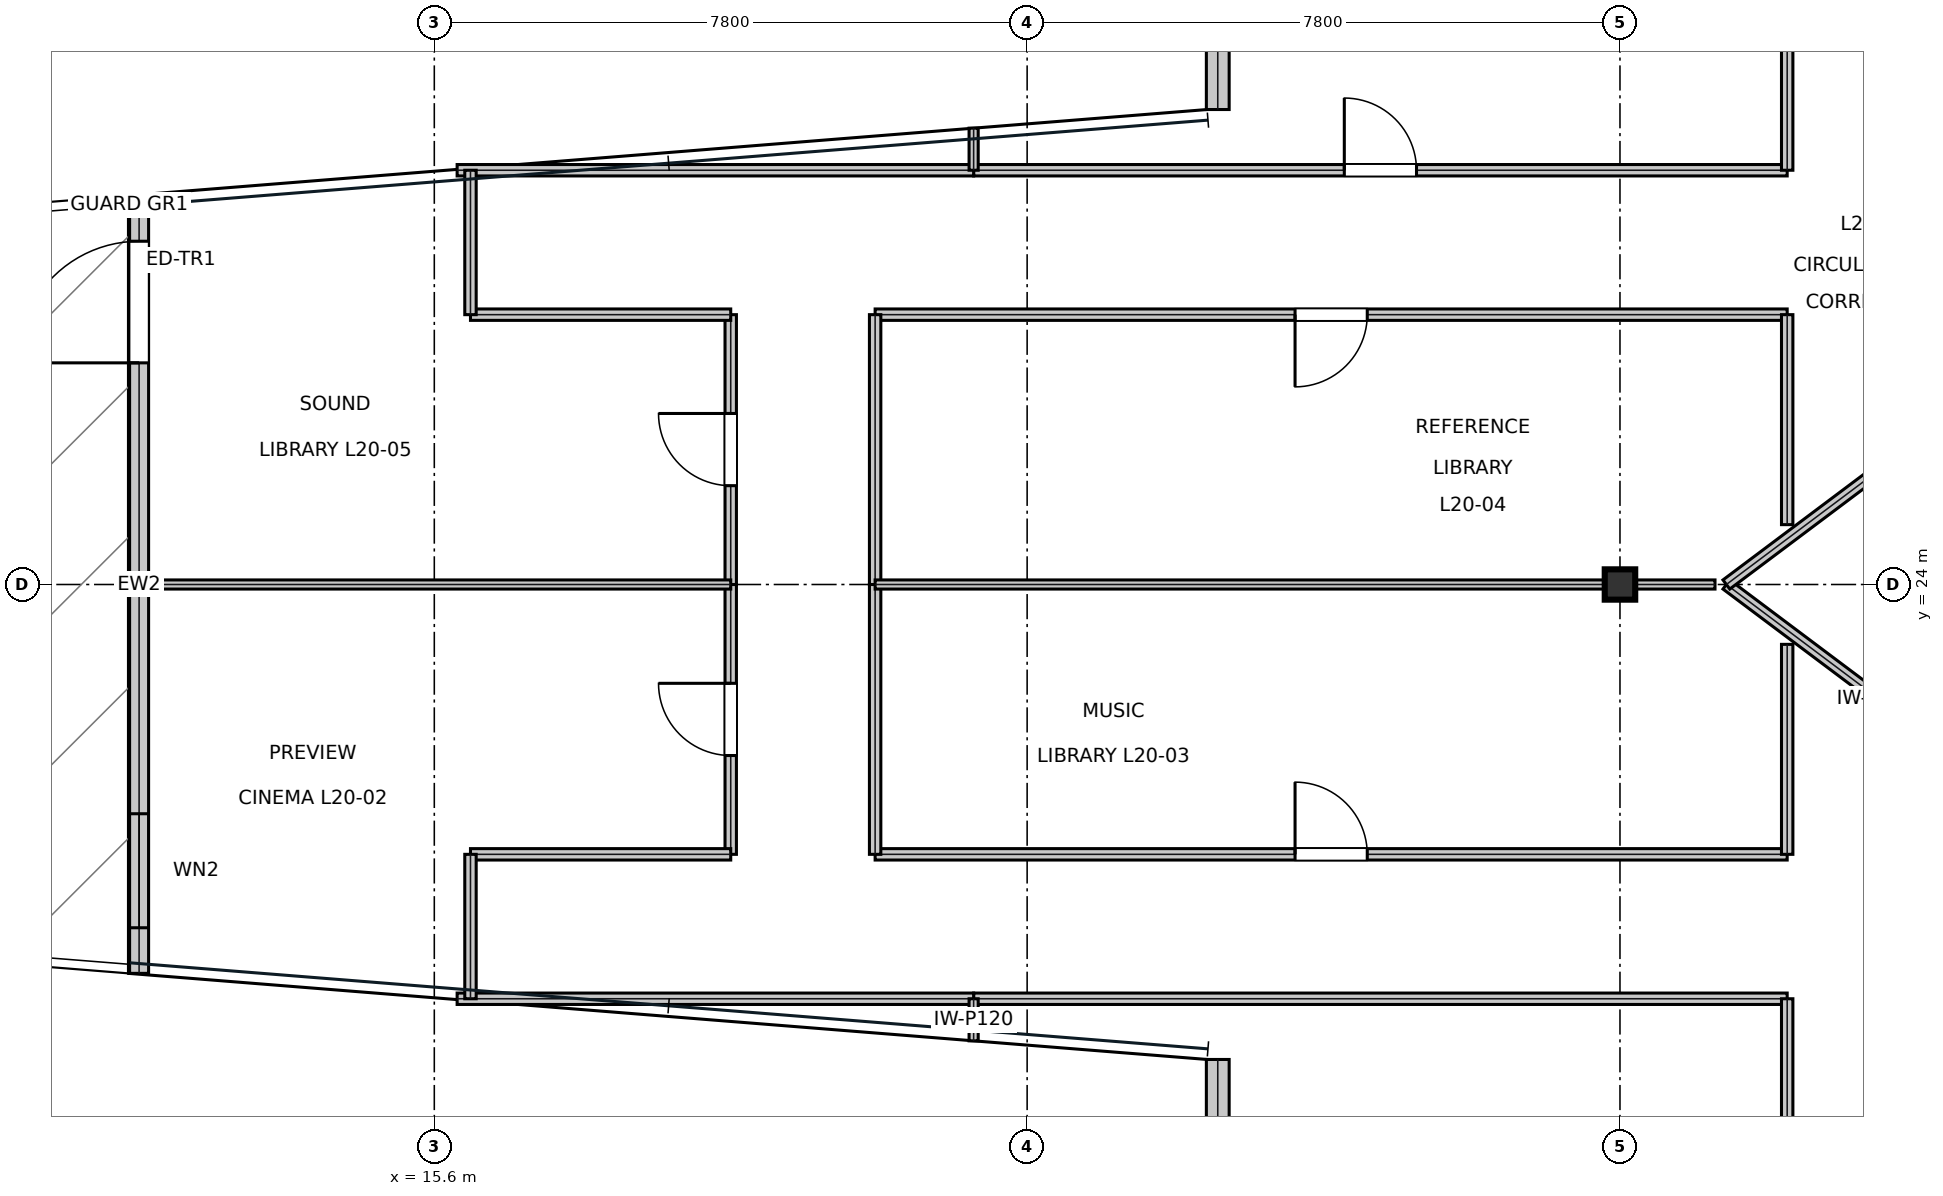
"""IFC4 building model, lengths in metres.
Left out: names, types, materials, properties, quantities, classifications, styles, units other than length and angle.
Written with IfcOpenShell. Run it as: python <this file> out.ifc"""

import sys

from ifc_helpers import new_model, si_unit, direction, frame, frame_2d, origin, origin_2d, place, context, subcontext, project, spatial, rectangle, i_section, extrude, element, fill, save


model = new_model("IFC4")
c1 = context("Model", 3, precision=1e-05, world=origin(), true_north=direction((0.0, 1.0)))
c2 = subcontext(c1, "Body", "Model", "MODEL_VIEW")
j1 = project(units=[si_unit("LENGTHUNIT", "METRE"), si_unit("PLANEANGLEUNIT", "RADIAN")], contexts=[c1])
p1 = place(None, origin())
s1 = spatial("IfcSite", under=j1, at=p1, CompositionType="ELEMENT")
p2 = place(p1, origin())
s2 = spatial("IfcBuilding", under=s1, at=p2, CompositionType="ELEMENT")
p3 = place(p2, frame((0.0, 0.0, 90.45)))
s3 = spatial("IfcBuildingStorey", under=s2, at=p3, CompositionType="ELEMENT", Elevation=90.45)
p4 = place(p3, frame((31.2, 24.0, 0.0), z_axis=(0.0, 0.0, 1.0), x_axis=(1.0, 0.0, 0.0)))
e1 = element("IfcColumn", 1, at=p4, inside=s3, PredefinedType="COLUMN", context=c2, shape_type="SweptSolid", body=[
    extrude(i_section(OverallWidth=0.401, OverallDepth=0.399, WebThickness=0.025, FlangeThickness=0.04, at=origin_2d()), origin(), (0.0, 0.0, 1.0), 4.044),
])
p5 = place(p3, frame((25.908, 32.0, 0.0), z_axis=(0.0, 0.0, 1.0), x_axis=(0.0, -1.0, 0.0)))
e2 = element("IfcWall", 2, at=p5, inside=s3, PredefinedType="STANDARD", context=c2, shape_type="SweptSolid", body=[
    extrude(rectangle(XDim=1.751, YDim=0.3, at=frame_2d((0.875, 0.0))), origin(), (0.0, 0.0, 1.0), 3.338),
])
p6 = place(p3, frame((11.716, 29.116, 0.0), z_axis=(0.0, 0.0, 1.0), x_axis=(0.0, -1.0, 0.0)))
e3 = element("IfcWall", 3, at=p6, inside=s3, PredefinedType="STANDARD", context=c2, shape_type="SweptSolid", body=[
    extrude(rectangle(XDim=10.232, YDim=0.25, at=frame_2d((5.116, 0.0))), origin(), (0.0, 0.0, 1.0), 3.181),
])
p7 = place(p6, frame((0.6, 0.0, 0.0)))
e4 = element("IfcOpeningElement", 4, at=p7, cuts=e3, PredefinedType="OPENING", context=c2, shape_type="SweptSolid", body=[
    extrude(rectangle(XDim=1.6, YDim=2.2, at=frame_2d((0.8, 1.1))), frame((0.0, 0.135, 0.0), z_axis=(0.0, -1.0, 0.0), x_axis=(1.0, 0.0, 0.0)), (0.0, 0.0, 1.0), 0.27),
])
p8 = place(p6, frame((8.132, 0.0, 0.95)))
e5 = element("IfcOpeningElement", 5, at=p8, cuts=e3, PredefinedType="OPENING", context=c2, shape_type="SweptSolid", body=[
    extrude(rectangle(XDim=1.5, YDim=1.6, at=frame_2d((0.75, 0.8))), frame((0.0, 0.135, 0.0), z_axis=(0.0, -1.0, 0.0), x_axis=(1.0, 0.0, 0.0)), (0.0, 0.0, 1.0), 0.27),
])
p9 = place(p3, frame((25.908, 17.751, 0.0), z_axis=(0.0, 0.0, 1.0), x_axis=(0.0, -1.0, 0.0)))
e6 = element("IfcWall", 6, at=p9, inside=s3, PredefinedType="STANDARD", context=c2, shape_type="SweptSolid", body=[
    extrude(rectangle(XDim=1.751, YDim=0.3, at=frame_2d((0.875, 0.0))), origin(), (0.0, 0.0, 1.0), 3.338),
])
p10 = place(p3, frame((19.5, 20.45, 0.0), z_axis=(0.0, 0.0, 1.0), x_axis=(0.0, 1.0, 0.0)))
e7 = element("IfcWall", 7, at=p10, inside=s3, PredefinedType="PARTITIONING", context=c2, shape_type="SweptSolid", body=[
    extrude(rectangle(XDim=3.55, YDim=0.15, at=frame_2d((1.775, 0.0))), origin(), (0.0, 0.0, 1.0), 3.181),
])
p11 = place(p10, frame((1.3, 0.0, 0.0)))
e8 = element("IfcOpeningElement", 8, at=p11, cuts=e7, PredefinedType="OPENING", context=c2, shape_type="SweptSolid", body=[
    extrude(rectangle(XDim=0.95, YDim=2.15, at=frame_2d((0.475, 1.075))), frame((0.0, 0.085, 0.0), z_axis=(0.0, -1.0, 0.0), x_axis=(1.0, 0.0, 0.0)), (0.0, 0.0, 1.0), 0.17),
])
p12 = place(p3, frame((21.4, 20.45, 0.0), z_axis=(0.0, 0.0, 1.0), x_axis=(1.0, 0.0, 0.0)))
e9 = element("IfcWall", 9, at=p12, inside=s3, PredefinedType="PARTITIONING", context=c2, shape_type="SweptSolid", body=[
    extrude(rectangle(XDim=12.0, YDim=0.15, at=frame_2d((6.0, 0.0))), origin(), (0.0, 0.0, 1.0), 3.181),
])
p13 = place(p12, frame((5.525, 0.0, 0.0)))
e10 = element("IfcOpeningElement", 10, at=p13, cuts=e9, PredefinedType="OPENING", context=c2, shape_type="SweptSolid", body=[
    extrude(rectangle(XDim=0.95, YDim=2.15, at=frame_2d((0.475, 1.075))), frame((0.0, 0.085, 0.0), z_axis=(0.0, -1.0, 0.0), x_axis=(1.0, 0.0, 0.0)), (0.0, 0.0, 1.0), 0.17),
])
p14 = place(p3, frame((21.4, 27.55, 0.0), z_axis=(0.0, 0.0, 1.0), x_axis=(1.0, 0.0, 0.0)))
e11 = element("IfcWall", 11, at=p14, inside=s3, PredefinedType="PARTITIONING", context=c2, shape_type="SweptSolid", body=[
    extrude(rectangle(XDim=12.0, YDim=0.15, at=frame_2d((6.0, 0.0))), origin(), (0.0, 0.0, 1.0), 3.181),
])
p15 = place(p14, frame((5.525, 0.0, 0.0)))
e12 = element("IfcOpeningElement", 12, at=p15, cuts=e11, PredefinedType="OPENING", context=c2, shape_type="SweptSolid", body=[
    extrude(rectangle(XDim=0.95, YDim=2.15, at=frame_2d((0.475, 1.075))), frame((0.0, 0.085, 0.0), z_axis=(0.0, -1.0, 0.0), x_axis=(1.0, 0.0, 0.0)), (0.0, 0.0, 1.0), 0.17),
])
p16 = place(p3, frame((19.5, 24.0, 0.0), z_axis=(0.0, 0.0, 1.0), x_axis=(0.0, 1.0, 0.0)))
e13 = element("IfcWall", 13, at=p16, inside=s3, PredefinedType="PARTITIONING", context=c2, shape_type="SweptSolid", body=[
    extrude(rectangle(XDim=3.55, YDim=0.15, at=frame_2d((1.775, 0.0))), origin(), (0.0, 0.0, 1.0), 3.181),
])
p17 = place(p16, frame((1.3, 0.0, 0.0)))
e14 = element("IfcOpeningElement", 14, at=p17, cuts=e13, PredefinedType="OPENING", context=c2, shape_type="SweptSolid", body=[
    extrude(rectangle(XDim=0.95, YDim=2.15, at=frame_2d((0.475, 1.075))), frame((0.0, 0.085, 0.0), z_axis=(0.0, -1.0, 0.0), x_axis=(1.0, 0.0, 0.0)), (0.0, 0.0, 1.0), 0.17),
])
p18 = place(p3, frame((22.696, 29.45, 0.0), z_axis=(0.0, 0.0, 1.0), x_axis=(1.0, 0.0, 0.0)))
e15 = element("IfcWall", 15, at=p18, inside=s3, PredefinedType="PARTITIONING", context=c2, shape_type="SweptSolid", body=[
    extrude(rectangle(XDim=10.704, YDim=0.15, at=frame_2d((5.352, 0.0))), origin(), (0.0, 0.0, 1.0), 3.181),
])
p19 = place(p18, frame((4.877, 0.0, 0.0)))
e16 = element("IfcOpeningElement", 16, at=p19, cuts=e15, PredefinedType="OPENING", context=c2, shape_type="SweptSolid", body=[
    extrude(rectangle(XDim=0.95, YDim=2.15, at=frame_2d((0.475, 1.075))), frame((0.0, 0.085, 0.0), z_axis=(0.0, -1.0, 0.0), x_axis=(1.0, 0.0, 0.0)), (0.0, 0.0, 1.0), 0.17),
])
p20 = place(p3, frame((22.696, 18.55, 0.0), z_axis=(0.0, 0.0, 1.0), x_axis=(1.0, 0.0, 0.0)))
e17 = element("IfcWall", 17, at=p20, inside=s3, PredefinedType="PARTITIONING", context=c2, shape_type="SweptSolid", body=[
    extrude(rectangle(XDim=10.704, YDim=0.15, at=frame_2d((5.352, 0.0))), origin(), (0.0, 0.0, 1.0), 3.181),
])
p21 = place(p3, frame((33.4, 15.8, 0.0), z_axis=(0.0, 0.0, 1.0), x_axis=(0.0, 1.0, 0.0)))
e18 = element("IfcWall", 18, at=p21, inside=s3, PredefinedType="PARTITIONING", context=c2, shape_type="SweptSolid", body=[
    extrude(rectangle(XDim=2.75, YDim=0.15, at=frame_2d((1.375, 0.0))), origin(), (0.0, 0.0, 1.0), 3.181),
])
p22 = place(p3, frame((15.9, 18.55, 0.0), z_axis=(0.0, 0.0, 1.0), x_axis=(1.0, 0.0, 0.0)))
e19 = element("IfcWall", 19, at=p22, inside=s3, PredefinedType="PARTITIONING", context=c2, shape_type="SweptSolid", body=[
    extrude(rectangle(XDim=6.796, YDim=0.15, at=frame_2d((3.398, 0.0))), origin(), (0.0, 0.0, 1.0), 3.338),
])
p23 = place(p3, frame((16.076, 20.45, 0.0), z_axis=(0.0, 0.0, 1.0), x_axis=(1.0, 0.0, 0.0)))
e20 = element("IfcWall", 20, at=p23, inside=s3, PredefinedType="PARTITIONING", context=c2, shape_type="SweptSolid", body=[
    extrude(rectangle(XDim=3.424, YDim=0.15, at=frame_2d((1.712, 0.0))), origin(), (0.0, 0.0, 1.0), 3.391),
])
p24 = place(p3, frame((16.076, 18.55, 0.0), z_axis=(0.0, 0.0, 1.0), x_axis=(0.0, 1.0, 0.0)))
e21 = element("IfcWall", 21, at=p24, inside=s3, PredefinedType="PARTITIONING", context=c2, shape_type="SweptSolid", body=[
    extrude(rectangle(XDim=1.9, YDim=0.15, at=frame_2d((0.95, 0.0))), origin(), (0.0, 0.0, 1.0), 3.338),
])
p25 = place(p3, frame((21.4, 20.45, 0.0), z_axis=(0.0, 0.0, 1.0), x_axis=(0.0, 1.0, 0.0)))
e22 = element("IfcWall", 22, at=p25, inside=s3, PredefinedType="PARTITIONING", context=c2, shape_type="SweptSolid", body=[
    extrude(rectangle(XDim=3.55, YDim=0.15, at=frame_2d((1.775, 0.0))), origin(), (0.0, 0.0, 1.0), 3.181),
])
p26 = place(p3, frame((33.4, 20.45, 0.0), z_axis=(0.0, 0.0, 1.0), x_axis=(0.0, 1.0, 0.0)))
e23 = element("IfcWall", 23, at=p26, inside=s3, PredefinedType="PARTITIONING", context=c2, shape_type="SweptSolid", body=[
    extrude(rectangle(XDim=2.762, YDim=0.15, at=frame_2d((1.381, 0.0))), origin(), (0.0, 0.0, 1.0), 3.81),
])
p27 = place(p3, frame((21.4, 24.0, 0.0), z_axis=(0.0, 0.0, 1.0), x_axis=(0.0, 1.0, 0.0)))
e24 = element("IfcWall", 24, at=p27, inside=s3, PredefinedType="PARTITIONING", context=c2, shape_type="SweptSolid", body=[
    extrude(rectangle(XDim=3.55, YDim=0.15, at=frame_2d((1.775, 0.0))), origin(), (0.0, 0.0, 1.0), 3.181),
])
p28 = place(p3, frame((33.4, 24.788, 0.0), z_axis=(0.0, 0.0, 1.0), x_axis=(0.0, 1.0, 0.0)))
e25 = element("IfcWall", 25, at=p28, inside=s3, PredefinedType="PARTITIONING", context=c2, shape_type="SweptSolid", body=[
    extrude(rectangle(XDim=2.762, YDim=0.15, at=frame_2d((1.381, 0.0))), origin(), (0.0, 0.0, 1.0), 3.81),
])
p29 = place(p3, frame((15.9, 29.45, 0.0), z_axis=(0.0, 0.0, 1.0), x_axis=(1.0, 0.0, 0.0)))
e26 = element("IfcWall", 26, at=p29, inside=s3, PredefinedType="PARTITIONING", context=c2, shape_type="SweptSolid", body=[
    extrude(rectangle(XDim=6.796, YDim=0.15, at=frame_2d((3.398, 0.0))), origin(), (0.0, 0.0, 1.0), 3.338),
])
p30 = place(p3, frame((16.076, 27.55, 0.0), z_axis=(0.0, 0.0, 1.0), x_axis=(1.0, 0.0, 0.0)))
e27 = element("IfcWall", 27, at=p30, inside=s3, PredefinedType="PARTITIONING", context=c2, shape_type="SweptSolid", body=[
    extrude(rectangle(XDim=3.424, YDim=0.15, at=frame_2d((1.712, 0.0))), origin(), (0.0, 0.0, 1.0), 3.81),
])
p31 = place(p3, frame((16.076, 27.55, 0.0), z_axis=(0.0, 0.0, 1.0), x_axis=(0.0, 1.0, 0.0)))
e28 = element("IfcWall", 28, at=p31, inside=s3, PredefinedType="PARTITIONING", context=c2, shape_type="SweptSolid", body=[
    extrude(rectangle(XDim=1.9, YDim=0.15, at=frame_2d((0.95, 0.0))), origin(), (0.0, 0.0, 1.0), 3.338),
])
p32 = place(p3, frame((33.4, 29.45, 0.0), z_axis=(0.0, 0.0, 1.0), x_axis=(0.0, 1.0, 0.0)))
e29 = element("IfcWall", 29, at=p32, inside=s3, PredefinedType="PARTITIONING", context=c2, shape_type="SweptSolid", body=[
    extrude(rectangle(XDim=2.75, YDim=0.15, at=frame_2d((1.375, 0.0))), origin(), (0.0, 0.0, 1.0), 3.181),
])
p33 = place(p3, frame((22.696, 17.996, 0.0), z_axis=(0.0, 0.0, 1.0), x_axis=(0.0, 1.0, 0.0)))
e30 = element("IfcWall", 30, at=p33, inside=s3, PredefinedType="PARTITIONING", context=c2, shape_type="SweptSolid", body=[
    extrude(rectangle(XDim=0.554, YDim=0.12, at=frame_2d((0.277, 0.0))), origin(), (0.0, 0.0, 1.0), 3.391),
])
p34 = place(p3, frame((11.576, 24.0, 0.0), z_axis=(0.0, 0.0, 1.0), x_axis=(1.0, 0.0, 0.0)))
e31 = element("IfcWall", 31, at=p34, inside=s3, PredefinedType="PARTITIONING", context=c2, shape_type="SweptSolid", body=[
    extrude(rectangle(XDim=7.924, YDim=0.12, at=frame_2d((3.962, 0.0))), origin(), (0.0, 0.0, 1.0), 3.391),
])
p35 = place(p3, frame((21.4, 24.0, 0.0), z_axis=(0.0, 0.0, 1.0), x_axis=(1.0, 0.0, 0.0)))
e32 = element("IfcWall", 32, at=p35, inside=s3, PredefinedType="PARTITIONING", context=c2, shape_type="SweptSolid", body=[
    extrude(rectangle(XDim=11.05, YDim=0.12, at=frame_2d((5.525, 0.0))), origin(), (0.0, 0.0, 1.0), 3.181),
])
p36 = place(p3, frame((22.696, 29.45, 0.0), z_axis=(0.0, 0.0, 1.0), x_axis=(0.0, 1.0, 0.0)))
e33 = element("IfcWall", 33, at=p36, inside=s3, PredefinedType="PARTITIONING", context=c2, shape_type="SweptSolid", body=[
    extrude(rectangle(XDim=0.554, YDim=0.12, at=frame_2d((0.277, 0.0))), origin(), (0.0, 0.0, 1.0), 3.81),
])
for number, where, z_axis, x_axis in (
    (34, (32.6, 24.0, 0.0), (0.0, 0.0, 1.0), (0.8, -0.6, 0.0)),
    (35, (36.6, 27.0, 0.0), (0.0, 0.0, 1.0), (-0.8, -0.6, 0.0)),
):
    element("IfcWall", number, at=place(p3, frame(where, z_axis=z_axis, x_axis=x_axis)), inside=s3, PredefinedType="MOVABLE", context=c2, shape_type="SweptSolid", body=[
        extrude(rectangle(XDim=5.0, YDim=0.15, at=frame_2d((2.5, 0.0))), origin(), (0.0, 0.0, 1.0), 3.81),
    ])
p37 = place(p7, frame((1.6, 0.0, 0.0), z_axis=(0.0, 0.0, 1.0), x_axis=(-1.0, 0.0, 0.0)))
e36 = element("IfcDoor", 36, at=p37, inside=s3, OperationType="SINGLE_SWING_LEFT", PredefinedType="DOOR", context=c2, shape_type="SweptSolid", body=[
    extrude(rectangle(XDim=1.6, YDim=2.2, at=frame_2d((0.8, 1.1))), frame((0.0, 0.025, 0.0), z_axis=(0.0, -1.0, 0.0), x_axis=(1.0, 0.0, 0.0)), (0.0, 0.0, 1.0), 0.05),
])
fill(e4, e36)
p38 = place(p8, origin())
e37 = element("IfcWindow", 37, at=p38, inside=s3, PartitioningType="SINGLE_PANEL", PredefinedType="WINDOW", context=c2, shape_type="SweptSolid", body=[
    extrude(rectangle(XDim=1.5, YDim=1.6, at=frame_2d((0.75, 0.8))), frame((0.0, 0.03, 0.0), z_axis=(0.0, -1.0, 0.0), x_axis=(1.0, 0.0, 0.0)), (0.0, 0.0, 1.0), 0.06),
])
fill(e5, e37)
p39 = place(p11, origin())
e38 = element("IfcDoor", 38, at=p39, inside=s3, OperationType="SINGLE_SWING_RIGHT", PredefinedType="DOOR", context=c2, shape_type="SweptSolid", body=[
    extrude(rectangle(XDim=0.95, YDim=2.15, at=frame_2d((0.475, 1.075))), frame((0.0, 0.025, 0.0), z_axis=(0.0, -1.0, 0.0), x_axis=(1.0, 0.0, 0.0)), (0.0, 0.0, 1.0), 0.05),
])
fill(e8, e38)
p40 = place(p13, origin())
e39 = element("IfcDoor", 39, at=p40, inside=s3, OperationType="SINGLE_SWING_LEFT", PredefinedType="DOOR", context=c2, shape_type="SweptSolid", body=[
    extrude(rectangle(XDim=0.95, YDim=2.15, at=frame_2d((0.475, 1.075))), frame((0.0, 0.025, 0.0), z_axis=(0.0, -1.0, 0.0), x_axis=(1.0, 0.0, 0.0)), (0.0, 0.0, 1.0), 0.05),
])
fill(e10, e39)
p41 = place(p15, frame((0.95, 0.0, 0.0), z_axis=(0.0, 0.0, 1.0), x_axis=(-1.0, 0.0, 0.0)))
e40 = element("IfcDoor", 40, at=p41, inside=s3, OperationType="SINGLE_SWING_RIGHT", PredefinedType="DOOR", context=c2, shape_type="SweptSolid", body=[
    extrude(rectangle(XDim=0.95, YDim=2.15, at=frame_2d((0.475, 1.075))), frame((0.0, 0.025, 0.0), z_axis=(0.0, -1.0, 0.0), x_axis=(1.0, 0.0, 0.0)), (0.0, 0.0, 1.0), 0.05),
])
fill(e12, e40)
p42 = place(p17, origin())
e41 = element("IfcDoor", 41, at=p42, inside=s3, OperationType="SINGLE_SWING_RIGHT", PredefinedType="DOOR", context=c2, shape_type="SweptSolid", body=[
    extrude(rectangle(XDim=0.95, YDim=2.15, at=frame_2d((0.475, 1.075))), frame((0.0, 0.025, 0.0), z_axis=(0.0, -1.0, 0.0), x_axis=(1.0, 0.0, 0.0)), (0.0, 0.0, 1.0), 0.05),
])
fill(e14, e41)
p43 = place(p19, origin())
e42 = element("IfcDoor", 42, at=p43, inside=s3, OperationType="SINGLE_SWING_LEFT", PredefinedType="DOOR", context=c2, shape_type="SweptSolid", body=[
    extrude(rectangle(XDim=0.95, YDim=2.15, at=frame_2d((0.475, 1.075))), frame((0.0, 0.025, 0.0), z_axis=(0.0, -1.0, 0.0), x_axis=(1.0, 0.0, 0.0)), (0.0, 0.0, 1.0), 0.05),
])
fill(e16, e42)
save(model, sys.argv[1])
